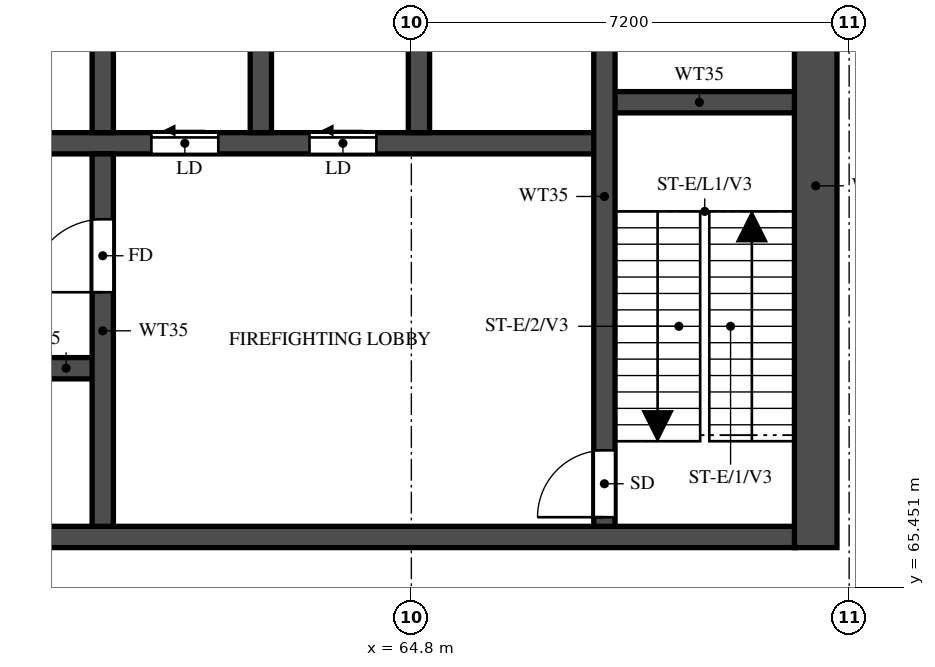
"""IFC4 building model, lengths in metres.
Left out: names, types, materials, properties, quantities, classifications, styles, units other than length and angle.
Written with IfcOpenShell. Run it as: python <this file> out.ifc"""

import sys

from ifc_helpers import new_model, si_unit, direction, frame, frame_2d, origin, place, context, subcontext, project, spatial, rectangle, extrude, element, fill, save


model = new_model("IFC4")
c1 = context("Model", 3, precision=1e-05, world=origin(), true_north=direction((0.0, 1.0)))
c2 = subcontext(c1, "Body", "Model", "MODEL_VIEW")
j1 = project(units=[si_unit("LENGTHUNIT", "METRE"), si_unit("PLANEANGLEUNIT", "RADIAN")], contexts=[c1])
p1 = place(None, origin())
s1 = spatial("IfcSite", under=j1, at=p1, CompositionType="ELEMENT")
p2 = place(p1, origin())
s2 = spatial("IfcBuilding", under=s1, at=p2, CompositionType="ELEMENT")
p3 = place(p2, frame((0.0, 0.0, 206.0)))
s3 = spatial("IfcBuildingStorey", under=s2, at=p3, CompositionType="ELEMENT", Elevation=206.0)
p4 = place(p3, frame((71.45, 66.1, 0.0), z_axis=(0.0, 0.0, 1.0), x_axis=(0.0, 1.0, 0.0)))
e1 = element("IfcWall", 1, at=p4, inside=s3, PredefinedType="SHEAR", context=c2, shape_type="SweptSolid", body=[
    extrude(rectangle(XDim=11.9, YDim=0.7, at=frame_2d((5.95, 0.0))), origin(), (0.0, 0.0, 1.0), 5.22),
])
p5 = place(p3, frame((29.7, 66.275, 0.0), z_axis=(0.0, 0.0, 1.0), x_axis=(1.0, 0.0, 0.0)))
e2 = element("IfcWall", 2, at=p5, inside=s3, PredefinedType="SHEAR", context=c2, shape_type="SweptSolid", body=[
    extrude(rectangle(XDim=41.4, YDim=0.35, at=frame_2d((20.7, 0.0))), origin(), (0.0, 0.0, 1.0), 5.22),
])
p6 = place(p5, frame((0.925, 0.0, 0.0)))
e3 = element("IfcOpeningElement", 3, at=p6, cuts=e2, PredefinedType="OPENING", context=c2, shape_type="SweptSolid", body=[
    extrude(rectangle(XDim=1.1, YDim=2.1, at=frame_2d((0.55, 1.05))), frame((0.0, 0.185, 0.0), z_axis=(0.0, -1.0, 0.0), x_axis=(1.0, 0.0, 0.0)), (0.0, 0.0, 1.0), 0.37),
])
p7 = place(p5, frame((3.712, 0.0, 0.0)))
e4 = element("IfcOpeningElement", 4, at=p7, cuts=e2, PredefinedType="OPENING", context=c2, shape_type="SweptSolid", body=[
    extrude(rectangle(XDim=1.8, YDim=2.1, at=frame_2d((0.9, 1.05))), frame((0.0, 0.185, 0.0), z_axis=(0.0, -1.0, 0.0), x_axis=(1.0, 0.0, 0.0)), (0.0, 0.0, 1.0), 0.37),
])
p8 = place(p3, frame((35.625, 69.05, 0.0), z_axis=(0.0, 0.0, 1.0), x_axis=(1.0, 0.0, 0.0)))
e5 = element("IfcWall", 5, at=p8, inside=s3, PredefinedType="SHEAR", context=c2, shape_type="SweptSolid", body=[
    extrude(rectangle(XDim=24.1, YDim=0.35, at=frame_2d((12.05, 0.0))), origin(), (0.0, 0.0, 1.0), 5.22),
])
p9 = place(p8, frame((1.0, 0.0, 0.0)))
e6 = element("IfcOpeningElement", 6, at=p9, cuts=e5, PredefinedType="OPENING", context=c2, shape_type="SweptSolid", body=[
    extrude(rectangle(XDim=1.1, YDim=2.1, at=frame_2d((0.55, 1.05))), frame((0.0, 0.185, 0.0), z_axis=(0.0, -1.0, 0.0), x_axis=(1.0, 0.0, 0.0)), (0.0, 0.0, 1.0), 0.37),
])
p10 = place(p8, frame((3.75, 0.0, 0.0)))
e7 = element("IfcOpeningElement", 7, at=p10, cuts=e5, PredefinedType="OPENING", context=c2, shape_type="SweptSolid", body=[
    extrude(rectangle(XDim=1.1, YDim=2.1, at=frame_2d((0.55, 1.05))), frame((0.0, 0.185, 0.0), z_axis=(0.0, -1.0, 0.0), x_axis=(1.0, 0.0, 0.0)), (0.0, 0.0, 1.0), 0.37),
])
p11 = place(p8, frame((6.5, 0.0, 0.0)))
e8 = element("IfcOpeningElement", 8, at=p11, cuts=e5, PredefinedType="OPENING", context=c2, shape_type="SweptSolid", body=[
    extrude(rectangle(XDim=1.1, YDim=2.1, at=frame_2d((0.55, 1.05))), frame((0.0, 0.185, 0.0), z_axis=(0.0, -1.0, 0.0), x_axis=(1.0, 0.0, 0.0)), (0.0, 0.0, 1.0), 0.37),
])
p12 = place(p8, frame((9.25, 0.0, 0.0)))
e9 = element("IfcOpeningElement", 9, at=p12, cuts=e5, PredefinedType="OPENING", context=c2, shape_type="SweptSolid", body=[
    extrude(rectangle(XDim=1.1, YDim=2.1, at=frame_2d((0.55, 1.05))), frame((0.0, 0.185, 0.0), z_axis=(0.0, -1.0, 0.0), x_axis=(1.0, 0.0, 0.0)), (0.0, 0.0, 1.0), 0.37),
])
p13 = place(p8, frame((12.0, 0.0, 0.0)))
e10 = element("IfcOpeningElement", 10, at=p13, cuts=e5, PredefinedType="OPENING", context=c2, shape_type="SweptSolid", body=[
    extrude(rectangle(XDim=1.1, YDim=2.1, at=frame_2d((0.55, 1.05))), frame((0.0, 0.185, 0.0), z_axis=(0.0, -1.0, 0.0), x_axis=(1.0, 0.0, 0.0)), (0.0, 0.0, 1.0), 0.37),
])
p14 = place(p8, frame((14.75, 0.0, 0.0)))
e11 = element("IfcOpeningElement", 11, at=p14, cuts=e5, PredefinedType="OPENING", context=c2, shape_type="SweptSolid", body=[
    extrude(rectangle(XDim=1.1, YDim=2.1, at=frame_2d((0.55, 1.05))), frame((0.0, 0.185, 0.0), z_axis=(0.0, -1.0, 0.0), x_axis=(1.0, 0.0, 0.0)), (0.0, 0.0, 1.0), 0.37),
])
p15 = place(p8, frame((17.625, 0.0, 0.0)))
e12 = element("IfcOpeningElement", 12, at=p15, cuts=e5, PredefinedType="OPENING", context=c2, shape_type="SweptSolid", body=[
    extrude(rectangle(XDim=1.1, YDim=2.1, at=frame_2d((0.55, 1.05))), frame((0.0, 0.185, 0.0), z_axis=(0.0, -1.0, 0.0), x_axis=(1.0, 0.0, 0.0)), (0.0, 0.0, 1.0), 0.37),
])
p16 = place(p8, frame((20.625, 0.0, 0.0)))
e13 = element("IfcOpeningElement", 13, at=p16, cuts=e5, PredefinedType="OPENING", context=c2, shape_type="SweptSolid", body=[
    extrude(rectangle(XDim=1.1, YDim=2.1, at=frame_2d((0.55, 1.05))), frame((0.0, 0.185, 0.0), z_axis=(0.0, -1.0, 0.0), x_axis=(1.0, 0.0, 0.0)), (0.0, 0.0, 1.0), 0.37),
])
p17 = place(p3, frame((32.825, 72.75, 0.0), z_axis=(0.0, 0.0, 1.0), x_axis=(1.0, 0.0, 0.0)))
e14 = element("IfcWall", 14, at=p17, inside=s3, PredefinedType="SHEAR", context=c2, shape_type="SweptSolid", body=[
    extrude(rectangle(XDim=35.15, YDim=0.35, at=frame_2d((17.575, 0.0))), origin(), (0.0, 0.0, 1.0), 5.22),
])
p18 = place(p17, frame((19.8, 0.0, 0.0)))
e15 = element("IfcOpeningElement", 15, at=p18, cuts=e14, PredefinedType="OPENING", context=c2, shape_type="SweptSolid", body=[
    extrude(rectangle(XDim=1.1, YDim=2.1, at=frame_2d((0.55, 1.05))), frame((0.0, 0.185, 0.0), z_axis=(0.0, -1.0, 0.0), x_axis=(1.0, 0.0, 0.0)), (0.0, 0.0, 1.0), 0.37),
])
p19 = place(p17, frame((27.7, 0.0, 0.0)))
e16 = element("IfcOpeningElement", 16, at=p19, cuts=e14, PredefinedType="OPENING", context=c2, shape_type="SweptSolid", body=[
    extrude(rectangle(XDim=1.1, YDim=2.1, at=frame_2d((0.55, 1.05))), frame((0.0, 0.185, 0.0), z_axis=(0.0, -1.0, 0.0), x_axis=(1.0, 0.0, 0.0)), (0.0, 0.0, 1.0), 0.37),
])
p20 = place(p17, frame((30.3, 0.0, 0.0)))
e17 = element("IfcOpeningElement", 17, at=p20, cuts=e14, PredefinedType="OPENING", context=c2, shape_type="SweptSolid", body=[
    extrude(rectangle(XDim=1.1, YDim=2.1, at=frame_2d((0.55, 1.05))), frame((0.0, 0.185, 0.0), z_axis=(0.0, -1.0, 0.0), x_axis=(1.0, 0.0, 0.0)), (0.0, 0.0, 1.0), 0.37),
])
p21 = place(p17, frame((3.8, 0.0, 0.0)))
e18 = element("IfcOpeningElement", 18, at=p21, cuts=e14, PredefinedType="OPENING", context=c2, shape_type="SweptSolid", body=[
    extrude(rectangle(XDim=1.1, YDim=2.1, at=frame_2d((0.55, 1.05))), frame((0.0, 0.185, 0.0), z_axis=(0.0, -1.0, 0.0), x_axis=(1.0, 0.0, 0.0)), (0.0, 0.0, 1.0), 0.37),
])
p22 = place(p17, frame((6.55, 0.0, 0.0)))
e19 = element("IfcOpeningElement", 19, at=p22, cuts=e14, PredefinedType="OPENING", context=c2, shape_type="SweptSolid", body=[
    extrude(rectangle(XDim=1.1, YDim=2.1, at=frame_2d((0.55, 1.05))), frame((0.0, 0.185, 0.0), z_axis=(0.0, -1.0, 0.0), x_axis=(1.0, 0.0, 0.0)), (0.0, 0.0, 1.0), 0.37),
])
p23 = place(p17, frame((9.3, 0.0, 0.0)))
e20 = element("IfcOpeningElement", 20, at=p23, cuts=e14, PredefinedType="OPENING", context=c2, shape_type="SweptSolid", body=[
    extrude(rectangle(XDim=1.1, YDim=2.1, at=frame_2d((0.55, 1.05))), frame((0.0, 0.185, 0.0), z_axis=(0.0, -1.0, 0.0), x_axis=(1.0, 0.0, 0.0)), (0.0, 0.0, 1.0), 0.37),
])
p24 = place(p17, frame((12.05, 0.0, 0.0)))
e21 = element("IfcOpeningElement", 21, at=p24, cuts=e14, PredefinedType="OPENING", context=c2, shape_type="SweptSolid", body=[
    extrude(rectangle(XDim=1.1, YDim=2.1, at=frame_2d((0.55, 1.05))), frame((0.0, 0.185, 0.0), z_axis=(0.0, -1.0, 0.0), x_axis=(1.0, 0.0, 0.0)), (0.0, 0.0, 1.0), 0.37),
])
p25 = place(p17, frame((14.8, 0.0, 0.0)))
e22 = element("IfcOpeningElement", 22, at=p25, cuts=e14, PredefinedType="OPENING", context=c2, shape_type="SweptSolid", body=[
    extrude(rectangle(XDim=1.1, YDim=2.1, at=frame_2d((0.55, 1.05))), frame((0.0, 0.185, 0.0), z_axis=(0.0, -1.0, 0.0), x_axis=(1.0, 0.0, 0.0)), (0.0, 0.0, 1.0), 0.37),
])
p26 = place(p17, frame((17.55, 0.0, 0.0)))
e23 = element("IfcOpeningElement", 23, at=p26, cuts=e14, PredefinedType="OPENING", context=c2, shape_type="SweptSolid", body=[
    extrude(rectangle(XDim=1.1, YDim=2.1, at=frame_2d((0.55, 1.05))), frame((0.0, 0.185, 0.0), z_axis=(0.0, -1.0, 0.0), x_axis=(1.0, 0.0, 0.0)), (0.0, 0.0, 1.0), 0.37),
])
p27 = place(p17, frame((0.938, 0.0, 0.0)))
e24 = element("IfcOpeningElement", 24, at=p27, cuts=e14, PredefinedType="OPENING", context=c2, shape_type="SweptSolid", body=[
    extrude(rectangle(XDim=1.1, YDim=2.1, at=frame_2d((0.55, 1.05))), frame((0.0, 0.185, 0.0), z_axis=(0.0, -1.0, 0.0), x_axis=(1.0, 0.0, 0.0)), (0.0, 0.0, 1.0), 0.37),
])
p28 = place(p3, frame((67.975, 73.425, 0.0), z_axis=(0.0, 0.0, 1.0), x_axis=(1.0, 0.0, 0.0)))
e25 = element("IfcWall", 25, at=p28, inside=s3, PredefinedType="SHEAR", context=c2, shape_type="SweptSolid", body=[
    extrude(rectangle(XDim=3.125, YDim=0.35, at=frame_2d((1.562, 0.0))), origin(), (0.0, 0.0, 1.0), 5.22),
])
p29 = place(p3, frame((67.975, 66.45, 0.0), z_axis=(0.0, 0.0, 1.0), x_axis=(0.0, 1.0, 0.0)))
e26 = element("IfcWall", 26, at=p29, inside=s3, PredefinedType="SHEAR", context=c2, shape_type="SweptSolid", body=[
    extrude(rectangle(XDim=10.85, YDim=0.35, at=frame_2d((5.425, 0.0))), origin(), (0.0, 0.0, 1.0), 5.22),
])
p30 = place(p29, frame((0.15, 0.0, 0.0)))
e27 = element("IfcOpeningElement", 27, at=p30, cuts=e26, PredefinedType="OPENING", context=c2, shape_type="SweptSolid", body=[
    extrude(rectangle(XDim=1.1, YDim=2.1, at=frame_2d((0.55, 1.05))), frame((0.0, 0.185, 0.0), z_axis=(0.0, -1.0, 0.0), x_axis=(1.0, 0.0, 0.0)), (0.0, 0.0, 1.0), 0.37),
])
p31 = place(p3, frame((59.725, 66.45, 0.0), z_axis=(0.0, 0.0, 1.0), x_axis=(0.0, 1.0, 0.0)))
e28 = element("IfcWall", 28, at=p31, inside=s3, PredefinedType="SHEAR", context=c2, shape_type="SweptSolid", body=[
    extrude(rectangle(XDim=6.125, YDim=0.35, at=frame_2d((3.062, 0.0))), origin(), (0.0, 0.0, 1.0), 5.22),
])
p32 = place(p31, frame((3.85, 0.0, 0.0)))
e29 = element("IfcOpeningElement", 29, at=p32, cuts=e28, PredefinedType="OPENING", context=c2, shape_type="SweptSolid", body=[
    extrude(rectangle(XDim=1.2, YDim=2.1, at=frame_2d((0.6, 1.05))), frame((0.0, 0.185, 0.0), z_axis=(0.0, -1.0, 0.0), x_axis=(1.0, 0.0, 0.0)), (0.0, 0.0, 1.0), 0.37),
])
for number, where, z_axis, x_axis in (
    (30, (59.725, 72.925, 0.0), (0.0, 0.0, 1.0), (0.0, 1.0, 0.0)),
    (31, (62.325, 72.925, 0.0), (0.0, 0.0, 1.0), (0.0, 1.0, 0.0)),
    (32, (64.925, 72.925, 0.0), (0.0, 0.0, 1.0), (0.0, 1.0, 0.0)),
):
    element("IfcWall", number, at=place(p3, frame(where, z_axis=z_axis, x_axis=x_axis)), inside=s3, PredefinedType="SHEAR", context=c2, shape_type="SweptSolid", body=[
        extrude(rectangle(XDim=2.95, YDim=0.35, at=frame_2d((1.475, 0.0))), origin(), (0.0, 0.0, 1.0), 5.22),
    ])
p33 = place(p30, origin())
e33 = element("IfcDoor", 33, at=p33, inside=s3, OperationType="SINGLE_SWING_LEFT", PredefinedType="DOOR", context=c2, shape_type="SweptSolid", body=[
    extrude(rectangle(XDim=1.1, YDim=2.1, at=frame_2d((0.55, 1.05))), frame((0.0, 0.025, 0.0), z_axis=(0.0, -1.0, 0.0), x_axis=(1.0, 0.0, 0.0)), (0.0, 0.0, 1.0), 0.05),
])
fill(e27, e33)
p34 = place(p32, origin())
e34 = element("IfcDoor", 34, at=p34, inside=s3, OperationType="SINGLE_SWING_LEFT", PredefinedType="DOOR", context=c2, shape_type="SweptSolid", body=[
    extrude(rectangle(XDim=1.2, YDim=2.1, at=frame_2d((0.6, 1.05))), frame((0.0, 0.025, 0.0), z_axis=(0.0, -1.0, 0.0), x_axis=(1.0, 0.0, 0.0)), (0.0, 0.0, 1.0), 0.05),
])
fill(e29, e34)
p35 = place(p19, origin())
e35 = element("IfcDoor", 35, at=p35, inside=s3, OperationType="SLIDING_TO_LEFT", PredefinedType="DOOR", context=c2, shape_type="SweptSolid", body=[
    extrude(rectangle(XDim=1.1, YDim=2.1, at=frame_2d((0.55, 1.05))), frame((0.0, 0.025, 0.0), z_axis=(0.0, -1.0, 0.0), x_axis=(1.0, 0.0, 0.0)), (0.0, 0.0, 1.0), 0.05),
])
fill(e16, e35)
p36 = place(p20, origin())
e36 = element("IfcDoor", 36, at=p36, inside=s3, OperationType="SLIDING_TO_LEFT", PredefinedType="DOOR", context=c2, shape_type="SweptSolid", body=[
    extrude(rectangle(XDim=1.1, YDim=2.1, at=frame_2d((0.55, 1.05))), frame((0.0, 0.025, 0.0), z_axis=(0.0, -1.0, 0.0), x_axis=(1.0, 0.0, 0.0)), (0.0, 0.0, 1.0), 0.05),
])
fill(e17, e36)
save(model, sys.argv[1])
